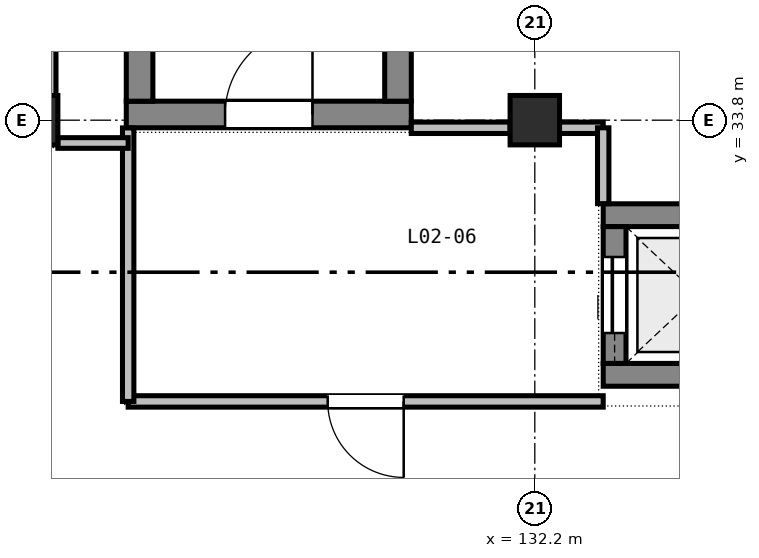
"""IFC4 building model, lengths in metres.
Left out: names, types, materials, properties, quantities, classifications, styles, units other than length and angle.
Written with IfcOpenShell. Run it as: python <this file> out.ifc"""

import sys

from ifc_helpers import new_model, si_unit, direction, frame, frame_2d, origin, origin_2d, place, context, subcontext, project, spatial, rectangle, extrude, element, fill, save


model = new_model("IFC4")
c1 = context("Model", 3, precision=1e-05, world=origin(), true_north=direction((0.0, 1.0)))
c2 = subcontext(c1, "Body", "Model", "MODEL_VIEW")
j1 = project(units=[si_unit("LENGTHUNIT", "METRE"), si_unit("PLANEANGLEUNIT", "RADIAN")], contexts=[c1])
p1 = place(None, origin())
s1 = spatial("IfcSite", under=j1, at=p1, CompositionType="ELEMENT")
p2 = place(p1, origin())
s2 = spatial("IfcBuilding", under=s1, at=p2, CompositionType="ELEMENT")
p3 = place(p2, frame((0.0, 0.0, 10.2)))
s3 = spatial("IfcBuildingStorey", under=s2, at=p3, CompositionType="ELEMENT", Elevation=10.2)
for number, where, z_axis, x_axis in (
    (1, (125.6, 33.8, 0.0), (0.0, 0.0, 1.0), (1.0, 0.0, 0.0)),
    (2, (132.2, 33.8, 0.0), (0.0, 0.0, 1.0), (1.0, 0.0, 0.0)),
):
    element("IfcColumn", number, at=place(p3, frame(where, z_axis=z_axis, x_axis=x_axis)), inside=s3, PredefinedType="COLUMN", context=c2, shape_type="SweptSolid", body=[
        extrude(rectangle(XDim=0.65, YDim=0.65, at=origin_2d()), origin(), (0.0, 0.0, 1.0), 4.8),
    ])
p4 = place(p3, frame((126.825, 33.875, 0.0), z_axis=(0.0, 0.0, 1.0), x_axis=(1.0, 0.0, 0.0)))
e3 = element("IfcWall", 3, at=p4, inside=s3, PredefinedType="SHEAR", context=c2, shape_type="SweptSolid", body=[
    extrude(rectangle(XDim=3.75, YDim=0.35, at=frame_2d((1.875, 0.0))), origin(), (0.0, 0.0, 1.0), 4.8),
])
p5 = place(p4, frame((1.3, 0.0, 0.0)))
e4 = element("IfcOpeningElement", 4, at=p5, cuts=e3, PredefinedType="OPENING", context=c2, shape_type="SweptSolid", body=[
    extrude(rectangle(XDim=1.15, YDim=2.15, at=frame_2d((0.575, 1.075))), frame((0.0, 0.185, 0.0), z_axis=(0.0, -1.0, 0.0), x_axis=(1.0, 0.0, 0.0)), (0.0, 0.0, 1.0), 0.37),
])
for number, where, z_axis, x_axis in (
    (5, (127.0, 34.05, 0.0), (0.0, 0.0, 1.0), (0.0, 1.0, 0.0)),
    (6, (130.4, 34.05, 0.0), (0.0, 0.0, 1.0), (0.0, 1.0, 0.0)),
):
    element("IfcWall", number, at=place(p3, frame(where, z_axis=z_axis, x_axis=x_axis)), inside=s3, PredefinedType="SHEAR", context=c2, shape_type="SweptSolid", body=[
        extrude(rectangle(XDim=7.275, YDim=0.35, at=frame_2d((3.637, 0.0))), origin(), (0.0, 0.0, 1.0), 4.8),
    ])
for number, where, z_axis, x_axis in (
    (7, (133.1, 30.45, 0.0), (0.0, 0.0, 1.0), (1.0, 0.0, 0.0)),
    (8, (133.1, 32.55, 0.0), (0.0, 0.0, 1.0), (1.0, 0.0, 0.0)),
):
    element("IfcWall", number, at=place(p3, frame(where, z_axis=z_axis, x_axis=x_axis)), inside=s3, PredefinedType="SHEAR", context=c2, shape_type="SweptSolid", body=[
        extrude(rectangle(XDim=2.5, YDim=0.3, at=frame_2d((1.25, 0.0))), origin(), (0.0, 0.0, 1.0), 4.8),
    ])
p6 = place(p3, frame((133.25, 30.6, 0.0), z_axis=(0.0, 0.0, 1.0), x_axis=(0.0, 1.0, 0.0)))
e9 = element("IfcWall", 9, at=p6, inside=s3, PredefinedType="SHEAR", context=c2, shape_type="SweptSolid", body=[
    extrude(rectangle(XDim=1.8, YDim=0.3, at=frame_2d((0.9, 0.0))), origin(), (0.0, 0.0, 1.0), 4.8),
])
p7 = place(p6, frame((0.4, 0.0, 0.0)))
e10 = element("IfcOpeningElement", 10, at=p7, cuts=e9, PredefinedType="OPENING", context=c2, shape_type="SweptSolid", body=[
    extrude(rectangle(XDim=1.0, YDim=2.1, at=frame_2d((0.5, 1.05))), frame((0.0, 0.16, 0.0), z_axis=(0.0, -1.0, 0.0), x_axis=(1.0, 0.0, 0.0)), (0.0, 0.0, 1.0), 0.32),
])
p8 = place(p3, frame((125.75, 34.1, 0.0), z_axis=(0.0, 0.0, 1.0), x_axis=(0.0, 1.0, 0.0)))
e11 = element("IfcWall", 11, at=p8, inside=s3, PredefinedType="STANDARD", context=c2, shape_type="SweptSolid", body=[
    extrude(rectangle(XDim=7.8, YDim=0.3, at=frame_2d((3.9, 0.0))), origin(), (0.0, 0.0, 1.0), 3.935),
])
p9 = place(p8, frame((0.781, 0.0, 0.9)))
e12 = element("IfcOpeningElement", 12, at=p9, cuts=e11, PredefinedType="OPENING", context=c2, shape_type="SweptSolid", body=[
    extrude(rectangle(XDim=2.65, YDim=1.85, at=frame_2d((1.325, 0.925))), frame((0.0, 0.16, 0.0), z_axis=(0.0, -1.0, 0.0), x_axis=(1.0, 0.0, 0.0)), (0.0, 0.0, 1.0), 0.32),
])
p10 = place(p8, frame((4.369, 0.0, 0.9)))
e13 = element("IfcOpeningElement", 13, at=p10, cuts=e11, PredefinedType="OPENING", context=c2, shape_type="SweptSolid", body=[
    extrude(rectangle(XDim=2.65, YDim=1.85, at=frame_2d((1.325, 0.925))), frame((0.0, 0.16, 0.0), z_axis=(0.0, -1.0, 0.0), x_axis=(1.0, 0.0, 0.0)), (0.0, 0.0, 1.0), 0.32),
])
p11 = place(p3, frame((130.575, 33.7, 0.0), z_axis=(0.0, 0.0, 1.0), x_axis=(1.0, 0.0, 0.0)))
e14 = element("IfcWall", 14, at=p11, inside=s3, PredefinedType="PARTITIONING", context=c2, shape_type="SweptSolid", body=[
    extrude(rectangle(XDim=1.3, YDim=0.15, at=frame_2d((0.65, 0.0))), origin(), (0.0, 0.0, 1.0), 4.135),
])
p12 = place(p3, frame((132.525, 33.7, 0.0), z_axis=(0.0, 0.0, 1.0), x_axis=(1.0, 0.0, 0.0)))
e15 = element("IfcWall", 15, at=p12, inside=s3, PredefinedType="PARTITIONING", context=c2, shape_type="SweptSolid", body=[
    extrude(rectangle(XDim=0.575, YDim=0.15, at=frame_2d((0.288, 0.0))), origin(), (0.0, 0.0, 1.0), 4.135),
])
p13 = place(p3, frame((133.1, 33.7, 0.0), z_axis=(0.0, 0.0, 1.0), x_axis=(0.0, -1.0, 0.0)))
e16 = element("IfcWall", 16, at=p13, inside=s3, PredefinedType="PARTITIONING", context=c2, shape_type="SweptSolid", body=[
    extrude(rectangle(XDim=0.998, YDim=0.15, at=frame_2d((0.499, 0.0))), origin(), (0.0, 0.0, 1.0), 4.135),
])
p14 = place(p3, frame((133.1, 30.1, 0.0), z_axis=(0.0, 0.0, 1.0), x_axis=(-1.0, 0.0, 0.0)))
e17 = element("IfcWall", 17, at=p14, inside=s3, PredefinedType="PARTITIONING", context=c2, shape_type="SweptSolid", body=[
    extrude(rectangle(XDim=6.25, YDim=0.15, at=frame_2d((3.125, 0.0))), origin(), (0.0, 0.0, 1.0), 3.935),
])
p15 = place(p14, frame((2.625, 0.0, 0.0)))
e18 = element("IfcOpeningElement", 18, at=p15, cuts=e17, PredefinedType="OPENING", context=c2, shape_type="SweptSolid", body=[
    extrude(rectangle(XDim=1.0, YDim=2.1, at=frame_2d((0.5, 1.05))), frame((0.0, 0.085, 0.0), z_axis=(0.0, -1.0, 0.0), x_axis=(1.0, 0.0, 0.0)), (0.0, 0.0, 1.0), 0.17),
])
p16 = place(p3, frame((126.85, 30.1, 0.0), z_axis=(0.0, 0.0, 1.0), x_axis=(0.0, 1.0, 0.0)))
e19 = element("IfcWall", 19, at=p16, inside=s3, PredefinedType="PARTITIONING", context=c2, shape_type="SweptSolid", body=[
    extrude(rectangle(XDim=3.598, YDim=0.15, at=frame_2d((1.799, 0.0))), origin(), (0.0, 0.0, 1.0), 4.135),
])
p17 = place(p3, frame((126.85, 33.5, 0.0), z_axis=(0.0, 0.0, 1.0), x_axis=(-1.0, 0.0, 0.0)))
e20 = element("IfcWall", 20, at=p17, inside=s3, PredefinedType="PARTITIONING", context=c2, shape_type="SweptSolid", body=[
    extrude(rectangle(XDim=0.925, YDim=0.14, at=frame_2d((0.462, 0.0))), origin(), (0.0, 0.0, 1.0), 3.935),
])
p18 = place(p5, origin())
e21 = element("IfcDoor", 21, at=p18, inside=s3, OperationType="SINGLE_SWING_RIGHT", PredefinedType="DOOR", context=c2, shape_type="SweptSolid", body=[
    extrude(rectangle(XDim=1.15, YDim=2.15, at=frame_2d((0.575, 1.075))), frame((0.0, 0.025, 0.0), z_axis=(0.0, -1.0, 0.0), x_axis=(1.0, 0.0, 0.0)), (0.0, 0.0, 1.0), 0.05),
])
fill(e4, e21)
p19 = place(p7, origin())
e22 = element("IfcDoor", 22, at=p19, inside=s3, OperationType="SLIDING_TO_LEFT", PredefinedType="DOOR", context=c2, shape_type="SweptSolid", body=[
    extrude(rectangle(XDim=1.0, YDim=2.1, at=frame_2d((0.5, 1.05))), frame((0.0, 0.025, 0.0), z_axis=(0.0, -1.0, 0.0), x_axis=(1.0, 0.0, 0.0)), (0.0, 0.0, 1.0), 0.05),
])
fill(e10, e22)
p20 = place(p15, origin())
e23 = element("IfcDoor", 23, at=p20, inside=s3, OperationType="SINGLE_SWING_LEFT", PredefinedType="DOOR", context=c2, shape_type="SweptSolid", body=[
    extrude(rectangle(XDim=1.0, YDim=2.1, at=frame_2d((0.5, 1.05))), frame((0.0, 0.025, 0.0), z_axis=(0.0, -1.0, 0.0), x_axis=(1.0, 0.0, 0.0)), (0.0, 0.0, 1.0), 0.05),
])
fill(e18, e23)
save(model, sys.argv[1])
